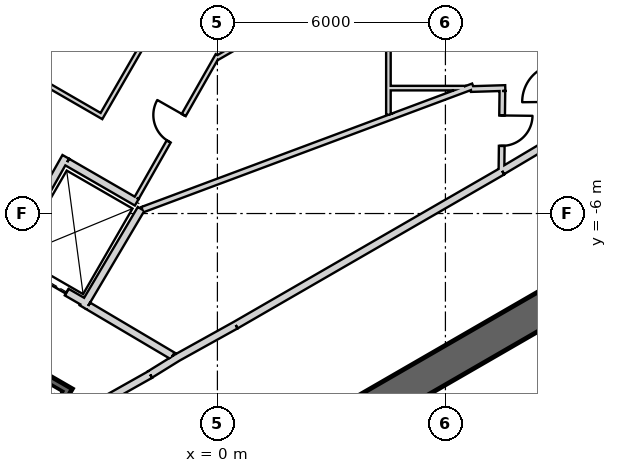
"""IFC4 building model, lengths in metres.
Left out: names, types, materials, properties, quantities, classifications, styles, units other than length and angle.
Written with IfcOpenShell. Run it as: python <this file> out.ifc"""

import sys

from ifc_helpers import new_model, si_unit, direction, frame, frame_2d, origin, place, context, subcontext, project, spatial, rectangle, extrude, element, fill, save


model = new_model("IFC4")
c1 = context("Model", 3, precision=1e-05, world=origin(), true_north=direction((0.0, 1.0)))
c2 = subcontext(c1, "Body", "Model", "MODEL_VIEW")
j1 = project(units=[si_unit("LENGTHUNIT", "METRE"), si_unit("PLANEANGLEUNIT", "RADIAN")], contexts=[c1])
p1 = place(None, origin())
s1 = spatial("IfcSite", under=j1, at=p1, CompositionType="ELEMENT")
p2 = place(p1, origin())
s2 = spatial("IfcBuilding", under=s1, at=p2, CompositionType="ELEMENT")
p3 = place(p2, frame((0.0, 0.0, 39.5)))
s3 = spatial("IfcBuildingStorey", under=s2, at=p3, CompositionType="ELEMENT", Elevation=39.5)
p4 = place(p3, frame((-7.825, -17.97, 0.0), z_axis=(0.0, 0.0, 1.0), x_axis=(0.866028369851, 0.499994862586, 0.0)))
e1 = element("IfcWall", 1, at=p4, inside=s3, PredefinedType="SHEAR", context=c2, shape_type="SweptSolid", body=[
    extrude(rectangle(XDim=31.523, YDim=0.9, at=frame_2d((15.762, 0.0))), origin(), (0.0, 0.0, 1.0), 6.0),
])
p5 = place(p4, frame((26.712, 0.0, 0.0)))
e2 = element("IfcOpeningElement", 2, at=p5, cuts=e1, PredefinedType="OPENING", context=c2, shape_type="SweptSolid", body=[
    extrude(rectangle(XDim=1.2, YDim=2.4, at=frame_2d((0.6, 1.2))), frame((0.0, 0.46, 0.0), z_axis=(0.0, -1.0, 0.0), x_axis=(1.0, 0.0, 0.0)), (0.0, 0.0, 1.0), 0.92),
])
p6 = place(p4, frame((3.612, 0.0, 0.0)))
e3 = element("IfcOpeningElement", 3, at=p6, cuts=e1, PredefinedType="OPENING", context=c2, shape_type="SweptSolid", body=[
    extrude(rectangle(XDim=1.2, YDim=2.4, at=frame_2d((0.6, 1.2))), frame((0.0, 0.46, 0.0), z_axis=(0.0, -1.0, 0.0), x_axis=(1.0, 0.0, 0.0)), (0.0, 0.0, 1.0), 0.92),
])
p7 = place(p3, frame((0.483, -8.936, 0.0), z_axis=(0.0, 0.0, 1.0), x_axis=(0.866030989016, 0.499990325971, 0.0)))
e4 = element("IfcWall", 4, at=p7, inside=s3, PredefinedType="PLUMBINGWALL", context=c2, shape_type="SweptSolid", body=[
    extrude(rectangle(XDim=8.1, YDim=0.2, at=frame_2d((4.05, 0.0))), origin(), (0.0, 0.0, 1.0), 5.7),
])
p8 = place(p3, frame((7.493, -4.878, 0.0), z_axis=(0.0, 0.0, 1.0), x_axis=(0.859981807212, 0.510324691999, 0.0)))
e5 = element("IfcWall", 5, at=p8, inside=s3, PredefinedType="PLUMBINGWALL", context=c2, shape_type="SweptSolid", body=[
    extrude(rectangle(XDim=1.845, YDim=0.2, at=frame_2d((0.922, 0.0))), origin(), (0.0, 0.0, 1.0), 5.7),
])
p9 = place(p3, frame((-1.769, -10.237, 0.0), z_axis=(0.0, 0.0, 1.0), x_axis=(-0.871534483978, -0.490334215854, 0.0)))
e6 = element("IfcWall", 6, at=p9, inside=s3, PredefinedType="PLUMBINGWALL", context=c2, shape_type="SweptSolid", body=[
    extrude(rectangle(XDim=2.7, YDim=0.2, at=frame_2d((1.35, 0.0))), origin(), (0.0, 0.0, 1.0), 5.7),
])
p10 = place(p3, frame((-1.024, -9.771, 0.0), z_axis=(0.0, 0.0, 1.0), x_axis=(-0.850348075135, -0.526220629693, 0.0)))
e7 = element("IfcWall", 7, at=p10, inside=s3, PredefinedType="PLUMBINGWALL", context=c2, shape_type="SweptSolid", body=[
    extrude(rectangle(XDim=0.878, YDim=0.2, at=frame_2d((0.439, 0.0))), origin(), (0.0, 0.0, 1.0), 5.7),
])
p11 = place(p3, frame((-1.13, -9.831, 0.0), z_axis=(0.0, 0.0, 1.0), x_axis=(0.874269620932, 0.485440655401, 0.0)))
e8 = element("IfcWall", 8, at=p11, inside=s3, PredefinedType="PLUMBINGWALL", context=c2, shape_type="SweptSolid", body=[
    extrude(rectangle(XDim=1.845, YDim=0.2, at=frame_2d((0.922, 0.0))), origin(), (0.0, 0.0, 1.0), 5.7),
])
p12 = place(p3, frame((-3.905, -10.563, -0.35), z_axis=(0.0, 0.0, 1.0), x_axis=(-0.500012932018, -0.866017937352, 0.0)))
e9 = element("IfcWall", 9, at=p12, inside=s3, PredefinedType="SHEAR", context=c2, shape_type="SweptSolid", body=[
    extrude(rectangle(XDim=8.1, YDim=0.2, at=frame_2d((4.05, 0.0))), origin(), (0.0, 0.0, 1.0), 6.05),
])
p13 = place(p3, frame((-4.041, -10.599, -0.35), z_axis=(0.0, 0.0, 1.0), x_axis=(-0.866047807691, 0.499961193289, 0.0)))
e10 = element("IfcWall", 10, at=p13, inside=s3, PredefinedType="SHEAR", context=c2, shape_type="SweptSolid", body=[
    extrude(rectangle(XDim=3.6, YDim=0.2, at=frame_2d((1.8, 0.0))), origin(), (0.0, 0.0, 1.0), 6.05),
])
p14 = place(p13, frame((1.25, 0.0, 0.35)))
e11 = element("IfcOpeningElement", 11, at=p14, cuts=e10, PredefinedType="OPENING", context=c2, shape_type="SweptSolid", body=[
    extrude(rectangle(XDim=1.1, YDim=2.1, at=frame_2d((0.55, 1.05))), frame((0.0, 0.11, 0.0), z_axis=(0.0, -1.0, 0.0), x_axis=(1.0, 0.0, 0.0)), (0.0, 0.0, 1.0), 0.22),
])
p15 = place(p3, frame((-3.446, -8.368, 0.0), z_axis=(0.0, 0.0, 1.0), x_axis=(-0.866024647952, 0.500001309137, 0.0)))
e12 = element("IfcWall", 12, at=p15, inside=s3, PredefinedType="PLUMBINGWALL", context=c2, shape_type="SweptSolid", body=[
    extrude(rectangle(XDim=2.4, YDim=0.2, at=frame_2d((1.2, 0.0))), origin(), (0.0, 0.0, 1.0), 5.7),
])
p16 = place(p15, frame((0.6, 0.0, 0.0)))
e13 = element("IfcOpeningElement", 13, at=p16, cuts=e12, PredefinedType="OPENING", context=c2, shape_type="SweptSolid", body=[
    extrude(rectangle(XDim=1.2, YDim=2.4, at=frame_2d((0.6, 1.2))), frame((0.0, 0.11, 0.0), z_axis=(0.0, -1.0, 0.0), x_axis=(1.0, 0.0, 0.0)), (0.0, 0.0, 1.0), 0.22),
])
p17 = place(p3, frame((-2.008, -5.878, 0.0), z_axis=(0.0, 0.0, 1.0), x_axis=(-0.508893526607, -0.860829471253, 0.0)))
e14 = element("IfcWall", 14, at=p17, inside=s3, PredefinedType="PLUMBINGWALL", context=c2, shape_type="SweptSolid", body=[
    extrude(rectangle(XDim=3.005, YDim=0.2, at=frame_2d((1.502, 0.0))), origin(), (0.0, 0.0, 1.0), 5.7),
])
p18 = place(p3, frame((-3.99, -4.509, 0.0), z_axis=(0.0, 0.0, 1.0), x_axis=(-0.491358283181, -0.870957540612, 0.0)))
e15 = element("IfcWall", 15, at=p18, inside=s3, PredefinedType="PLUMBINGWALL", context=c2, shape_type="SweptSolid", body=[
    extrude(rectangle(XDim=3.2, YDim=0.2, at=frame_2d((1.6, 0.0))), origin(), (0.0, 0.0, 1.0), 5.7),
])
p19 = place(p3, frame((-3.953, -4.646, 0.0), z_axis=(0.0, 0.0, 1.0), x_axis=(0.866060616833, -0.499939004251, 0.0)))
e16 = element("IfcWall", 16, at=p19, inside=s3, PredefinedType="PLUMBINGWALL", context=c2, shape_type="SweptSolid", body=[
    extrude(rectangle(XDim=2.115, YDim=0.2, at=frame_2d((1.057, 0.0))), origin(), (0.0, 0.0, 1.0), 5.7),
])
p20 = place(p3, frame((-3.401, -8.43, 0.0), z_axis=(0.0, 0.0, 1.0), x_axis=(0.860615607571, -0.509255118781, 0.0)))
e17 = element("IfcWall", 17, at=p20, inside=s3, PredefinedType="PARTITIONING", context=c2, shape_type="SweptSolid", body=[
    extrude(rectangle(XDim=2.581, YDim=0.2, at=frame_2d((1.29, 0.0))), origin(), (0.0, 0.0, 1.0), 5.7),
])
p21 = place(p3, frame((6.729, -2.65, 0.0), z_axis=(0.0, 0.0, 1.0), x_axis=(-0.936914282609, -0.349559189613, 0.0)))
e18 = element("IfcWall", 18, at=p21, inside=s3, PredefinedType="PLUMBINGWALL", context=c2, shape_type="SweptSolid", body=[
    extrude(rectangle(XDim=9.291, YDim=0.15, at=frame_2d((4.645, 0.0))), origin(), (0.0, 0.0, 1.0), 5.7),
])
p22 = place(p3, frame((0.007, -1.836, 0.0), z_axis=(0.0, 0.0, 1.0), x_axis=(-0.494077470797, -0.869417881603, 0.0)))
e19 = element("IfcWall", 19, at=p22, inside=s3, PredefinedType="PARTITIONING", context=c2, shape_type="SweptSolid", body=[
    extrude(rectangle(XDim=4.314, YDim=0.12, at=frame_2d((2.157, 0.0))), origin(), (0.0, 0.0, 1.0), 5.7),
])
p23 = place(p22, frame((1.808, 0.0, 0.0)))
e20 = element("IfcOpeningElement", 20, at=p23, cuts=e19, PredefinedType="OPENING", context=c2, shape_type="SweptSolid", body=[
    extrude(rectangle(XDim=0.8, YDim=2.1, at=frame_2d((0.4, 1.05))), frame((0.0, 0.07, 0.0), z_axis=(0.0, -1.0, 0.0), x_axis=(1.0, 0.0, 0.0)), (0.0, 0.0, 1.0), 0.14),
])
p24 = place(p3, frame((1.779, -0.873, 0.0), z_axis=(0.0, 0.0, 1.0), x_axis=(-0.866029591389, -0.499992746786, 0.0)))
e21 = element("IfcWall", 21, at=p24, inside=s3, PredefinedType="PARTITIONING", context=c2, shape_type="SweptSolid", body=[
    extrude(rectangle(XDim=2.085, YDim=0.12, at=frame_2d((1.042, 0.0))), origin(), (0.0, 0.0, 1.0), 5.7),
])
p25 = place(p3, frame((4.5, -3.402, 0.0), z_axis=(0.0, 0.0, 1.0), x_axis=(0.0, 1.0, 0.0)))
e22 = element("IfcWall", 22, at=p25, inside=s3, PredefinedType="PARTITIONING", context=c2, shape_type="SweptSolid", body=[
    extrude(rectangle(XDim=2.417, YDim=0.12, at=frame_2d((1.208, 0.0))), origin(), (0.0, 0.0, 1.0), 5.7),
])
p26 = place(p3, frame((6.521, -2.7, 0.0), z_axis=(0.0, 0.0, 1.0), x_axis=(-1.0, 0.0, 0.0)))
e23 = element("IfcWall", 23, at=p26, inside=s3, PredefinedType="PARTITIONING", context=c2, shape_type="SweptSolid", body=[
    extrude(rectangle(XDim=1.961, YDim=0.12, at=frame_2d((0.98, 0.0))), origin(), (0.0, 0.0, 1.0), 5.7),
])
p27 = place(p3, frame((7.575, -2.698, 0.0), z_axis=(0.0, 0.0, 1.0), x_axis=(-0.999552240565, -0.029921871279, 0.0)))
e24 = element("IfcWall", 24, at=p27, inside=s3, PredefinedType="PLUMBINGWALL", context=c2, shape_type="SweptSolid", body=[
    extrude(rectangle(XDim=0.906, YDim=0.15, at=frame_2d((0.453, 0.0))), origin(), (0.0, 0.0, 1.0), 5.7),
])
p28 = place(p3, frame((7.475, -4.865, 0.0), z_axis=(0.0, 0.0, 1.0), x_axis=(0.011682810534, 0.99993175364, 0.0)))
e25 = element("IfcWall", 25, at=p28, inside=s3, PredefinedType="PLUMBINGWALL", context=c2, shape_type="SweptSolid", body=[
    extrude(rectangle(XDim=2.09, YDim=0.15, at=frame_2d((1.045, 0.0))), origin(), (0.0, 0.0, 1.0), 5.7),
])
p29 = place(p28, frame((0.645, 0.0, 0.0)))
e26 = element("IfcOpeningElement", 26, at=p29, cuts=e25, PredefinedType="OPENING", context=c2, shape_type="SweptSolid", body=[
    extrude(rectangle(XDim=0.8, YDim=2.1, at=frame_2d((0.4, 1.05))), frame((0.0, 0.085, 0.0), z_axis=(0.0, -1.0, 0.0), x_axis=(1.0, 0.0, 0.0)), (0.0, 0.0, 1.0), 0.17),
])
p30 = place(p3, frame((-3.081, -3.487, 0.0), z_axis=(0.0, 0.0, 1.0), x_axis=(0.499986688891, 0.86603308882, 0.0)))
e27 = element("IfcWall", 27, at=p30, inside=s3, PredefinedType="PARTITIONING", context=c2, shape_type="SweptSolid", body=[
    extrude(rectangle(XDim=2.853, YDim=0.12, at=frame_2d((1.426, 0.0))), origin(), (0.0, 0.0, 1.0), 5.7),
])
p31 = place(p3, frame((-4.64, -2.517, 0.0), z_axis=(0.0, 0.0, 1.0), x_axis=(0.866025242659, -0.500000279077, 0.0)))
e28 = element("IfcWall", 28, at=p31, inside=s3, PredefinedType="PARTITIONING", context=c2, shape_type="SweptSolid", body=[
    extrude(rectangle(XDim=1.775, YDim=0.12, at=frame_2d((0.887, 0.0))), origin(), (0.0, 0.0, 1.0), 5.7),
])
p32 = place(p3, frame((3.8, -15.242, 0.0), z_axis=(0.0, 0.0, 1.0), x_axis=(0.866025905383, 0.499999131204, 0.0)))
e29 = element("IfcWall", 29, at=p32, inside=s3, PredefinedType="PARTITIONING", context=c2, shape_type="SweptSolid", body=[
    extrude(rectangle(XDim=20.7, YDim=0.2, at=frame_2d((10.35, 0.0))), origin(), (0.0, 0.0, 1.0), 4.88),
])
p33 = place(p32, frame((1.636, 0.0, 0.0)))
e30 = element("IfcOpeningElement", 30, at=p33, cuts=e29, PredefinedType="OPENING", context=c2, shape_type="SweptSolid", body=[
    extrude(rectangle(XDim=1.0, YDim=2.1, at=frame_2d((0.5, 1.05))), frame((0.0, 0.11, 0.0), z_axis=(0.0, -1.0, 0.0), x_axis=(1.0, 0.0, 0.0)), (0.0, 0.0, 1.0), 0.22),
])
p34 = place(p32, frame((5.812, 0.0, 0.0)))
e31 = element("IfcOpeningElement", 31, at=p34, cuts=e29, PredefinedType="OPENING", context=c2, shape_type="SweptSolid", body=[
    extrude(rectangle(XDim=1.0, YDim=2.1, at=frame_2d((0.5, 1.05))), frame((0.0, 0.11, 0.0), z_axis=(0.0, -1.0, 0.0), x_axis=(1.0, 0.0, 0.0)), (0.0, 0.0, 1.0), 0.22),
])
p35 = place(p32, frame((9.987, 0.0, 0.0)))
e32 = element("IfcOpeningElement", 32, at=p35, cuts=e29, PredefinedType="OPENING", context=c2, shape_type="SweptSolid", body=[
    extrude(rectangle(XDim=1.0, YDim=2.1, at=frame_2d((0.5, 1.05))), frame((0.0, 0.11, 0.0), z_axis=(0.0, -1.0, 0.0), x_axis=(1.0, 0.0, 0.0)), (0.0, 0.0, 1.0), 0.22),
])
p36 = place(p32, frame((14.162, 0.0, 0.0)))
e33 = element("IfcOpeningElement", 33, at=p36, cuts=e29, PredefinedType="OPENING", context=c2, shape_type="SweptSolid", body=[
    extrude(rectangle(XDim=1.0, YDim=2.1, at=frame_2d((0.5, 1.05))), frame((0.0, 0.11, 0.0), z_axis=(0.0, -1.0, 0.0), x_axis=(1.0, 0.0, 0.0)), (0.0, 0.0, 1.0), 0.22),
])
p37 = place(p32, frame((18.138, 0.0, 0.0)))
e34 = element("IfcOpeningElement", 34, at=p37, cuts=e29, PredefinedType="OPENING", context=c2, shape_type="SweptSolid", body=[
    extrude(rectangle(XDim=1.0, YDim=2.1, at=frame_2d((0.5, 1.05))), frame((0.0, 0.11, 0.0), z_axis=(0.0, -1.0, 0.0), x_axis=(1.0, 0.0, 0.0)), (0.0, 0.0, 1.0), 0.22),
])
p38 = place(p16, origin())
e35 = element("IfcDoor", 35, at=p38, inside=s3, OperationType="SLIDING_TO_LEFT", PredefinedType="USERDEFINED", context=c2, shape_type="SweptSolid", body=[
    extrude(rectangle(XDim=1.2, YDim=2.4, at=frame_2d((0.6, 1.2))), frame((0.0, 0.025, 0.0), z_axis=(0.0, -1.0, 0.0), x_axis=(1.0, 0.0, 0.0)), (0.0, 0.0, 1.0), 0.05),
])
fill(e13, e35)
p39 = place(p23, origin())
e36 = element("IfcDoor", 36, at=p39, inside=s3, OperationType="SINGLE_SWING_LEFT", PredefinedType="USERDEFINED", context=c2, shape_type="SweptSolid", body=[
    extrude(rectangle(XDim=0.8, YDim=2.1, at=frame_2d((0.4, 1.05))), frame((0.0, 0.025, 0.0), z_axis=(0.0, -1.0, 0.0), x_axis=(1.0, 0.0, 0.0)), (0.0, 0.0, 1.0), 0.05),
])
fill(e20, e36)
p40 = place(p29, origin())
e37 = element("IfcDoor", 37, at=p40, inside=s3, OperationType="SINGLE_SWING_RIGHT", PredefinedType="USERDEFINED", context=c2, shape_type="SweptSolid", body=[
    extrude(rectangle(XDim=0.8, YDim=2.1, at=frame_2d((0.4, 1.05))), frame((0.0, 0.025, 0.0), z_axis=(0.0, -1.0, 0.0), x_axis=(1.0, 0.0, 0.0)), (0.0, 0.0, 1.0), 0.05),
])
fill(e26, e37)
save(model, sys.argv[1])
